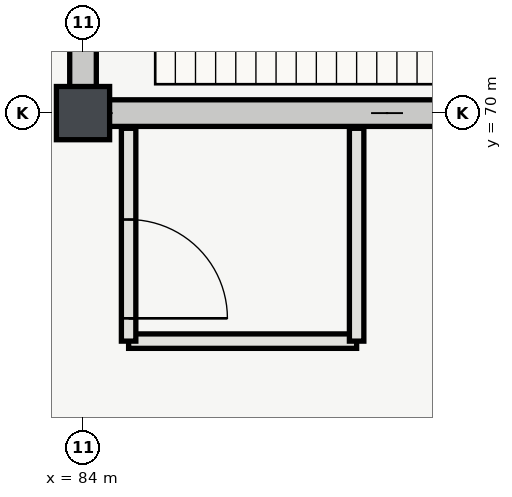
"""IFC4 building model, lengths in metres.
Left out: names, types, materials, properties, quantities, classifications, styles, units other than length and angle.
Written with IfcOpenShell. Run it as: python <this file> out.ifc"""

import sys

from ifc_helpers import new_model, si_unit, direction, frame, frame_2d, origin, origin_2d, place, context, subcontext, project, spatial, rectangle, extrude, element, fill, save


model = new_model("IFC4")
c1 = context("Model", 3, precision=1e-05, world=origin(), true_north=direction((0.0, 1.0)))
c2 = subcontext(c1, "Body", "Model", "MODEL_VIEW")
j1 = project(units=[si_unit("LENGTHUNIT", "METRE"), si_unit("PLANEANGLEUNIT", "RADIAN")], contexts=[c1])
p1 = place(None, origin())
s1 = spatial("IfcSite", under=j1, at=p1, CompositionType="ELEMENT")
p2 = place(p1, origin())
s2 = spatial("IfcBuilding", under=s1, at=p2, CompositionType="ELEMENT")
p3 = place(p2, frame((0.0, 0.0, -4.8)))
s3 = spatial("IfcBuildingStorey", under=s2, at=p3, CompositionType="ELEMENT", Elevation=-4.8)
p4 = place(p3, frame((84.0, 70.0, 0.0), z_axis=(0.0, 0.0, 1.0), x_axis=(1.0, 0.0, 0.0)))
e1 = element("IfcColumn", 1, at=p4, inside=s3, PredefinedType="COLUMN", context=c2, shape_type="SweptSolid", body=[
    extrude(rectangle(XDim=0.7, YDim=0.7, at=origin_2d()), origin(), (0.0, 0.0, 1.0), 4.8),
])
p5 = place(p3, frame((83.825, 70.0, 0.0), z_axis=(0.0, 0.0, 1.0), x_axis=(1.0, 0.0, 0.0)))
e2 = element("IfcWall", 2, at=p5, inside=s3, PredefinedType="SHEAR", context=c2, shape_type="SweptSolid", body=[
    extrude(rectangle(XDim=8.35, YDim=0.35, at=frame_2d((4.175, 0.0))), origin(), (0.0, 0.0, 1.0), 4.52),
])
p6 = place(p3, frame((84.0, 70.175, 0.0), z_axis=(0.0, 0.0, 1.0), x_axis=(0.0, 1.0, 0.0)))
e3 = element("IfcWall", 3, at=p6, inside=s3, PredefinedType="SHEAR", context=c2, shape_type="SweptSolid", body=[
    extrude(rectangle(XDim=7.65, YDim=0.35, at=frame_2d((3.825, 0.0))), origin(), (0.0, 0.0, 1.0), 4.52),
])
p7 = place(p6, frame((1.625, 0.0, 0.0)))
e4 = element("IfcOpeningElement", 4, at=p7, cuts=e3, PredefinedType="OPENING", context=c2, shape_type="SweptSolid", body=[
    extrude(rectangle(XDim=1.4, YDim=2.2, at=frame_2d((0.7, 1.1))), frame((0.0, 0.185, 0.0), z_axis=(0.0, -1.0, 0.0), x_axis=(1.0, 0.0, 0.0)), (0.0, 0.0, 1.0), 0.37),
])
p8 = place(p3, frame((84.6, 67.0, 0.0), z_axis=(0.0, 0.0, 1.0), x_axis=(1.0, 0.0, 0.0)))
e5 = element("IfcWall", 5, at=p8, inside=s3, PredefinedType="PARTITIONING", context=c2, shape_type="SweptSolid", body=[
    extrude(rectangle(XDim=3.0, YDim=0.19, at=frame_2d((1.5, 0.0))), origin(), (0.0, 0.0, 1.0), 4.52),
])
p9 = place(p3, frame((84.6, 69.8, 0.0), z_axis=(0.0, 0.0, 1.0), x_axis=(0.0, -1.0, 0.0)))
e6 = element("IfcWall", 6, at=p9, inside=s3, PredefinedType="PARTITIONING", context=c2, shape_type="SweptSolid", body=[
    extrude(rectangle(XDim=2.8, YDim=0.19, at=frame_2d((1.4, 0.0))), origin(), (0.0, 0.0, 1.0), 4.52),
])
p10 = place(p9, frame((1.2, 0.0, 0.0)))
e7 = element("IfcOpeningElement", 7, at=p10, cuts=e6, PredefinedType="OPENING", context=c2, shape_type="SweptSolid", body=[
    extrude(rectangle(XDim=1.3, YDim=2.2, at=frame_2d((0.65, 1.1))), frame((0.0, 0.105, 0.0), z_axis=(0.0, -1.0, 0.0), x_axis=(1.0, 0.0, 0.0)), (0.0, 0.0, 1.0), 0.21),
])
p11 = place(p3, frame((87.6, 67.0, 0.0), z_axis=(0.0, 0.0, 1.0), x_axis=(0.0, 1.0, 0.0)))
e8 = element("IfcWall", 8, at=p11, inside=s3, PredefinedType="PARTITIONING", context=c2, shape_type="SweptSolid", body=[
    extrude(rectangle(XDim=2.8, YDim=0.19, at=frame_2d((1.4, 0.0))), origin(), (0.0, 0.0, 1.0), 4.52),
])
p12 = place(p10, origin())
e9 = element("IfcDoor", 9, at=p12, inside=s3, OperationType="SINGLE_SWING_RIGHT", PredefinedType="DOOR", context=c2, shape_type="SweptSolid", body=[
    extrude(rectangle(XDim=1.3, YDim=2.2, at=frame_2d((0.65, 1.1))), frame((0.0, 0.025, 0.0), z_axis=(0.0, -1.0, 0.0), x_axis=(1.0, 0.0, 0.0)), (0.0, 0.0, 1.0), 0.05),
])
fill(e7, e9)
save(model, sys.argv[1])
